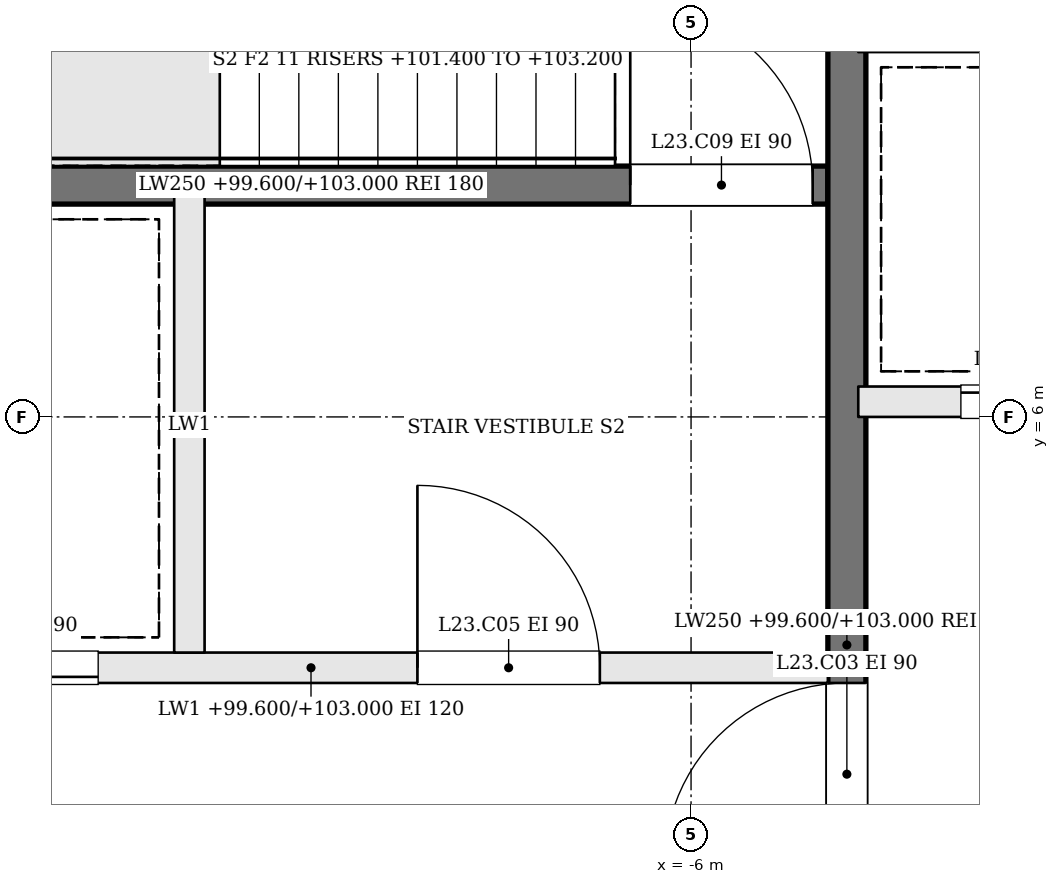
"""IFC4 building model, lengths in metres.
Left out: names, types, materials, properties, quantities, classifications, styles, units other than length and angle.
Written with IfcOpenShell. Run it as: python <this file> out.ifc"""

import sys

from ifc_helpers import new_model, si_unit, direction, frame, frame_2d, origin, place, context, subcontext, project, spatial, rectangle, extrude, element, fill, save


model = new_model("IFC4")
c1 = context("Model", 3, precision=1e-05, world=origin(), true_north=direction((0.0, 1.0)))
c2 = subcontext(c1, "Body", "Model", "MODEL_VIEW")
j1 = project(units=[si_unit("LENGTHUNIT", "METRE"), si_unit("PLANEANGLEUNIT", "RADIAN")], contexts=[c1])
p1 = place(None, origin())
s1 = spatial("IfcSite", under=j1, at=p1, CompositionType="ELEMENT")
p2 = place(p1, origin())
s2 = spatial("IfcBuilding", under=s1, at=p2, CompositionType="ELEMENT")
p3 = place(p2, frame((0.0, 0.0, 99.6)))
s3 = spatial("IfcBuildingStorey", under=s2, at=p3, CompositionType="ELEMENT", Elevation=99.6)
p4 = place(p3, frame((-11.9, 4.35, 0.0), z_axis=(0.0, 0.0, 1.0), x_axis=(1.0, 0.0, 0.0)))
e1 = element("IfcWall", 1, at=p4, inside=s3, PredefinedType="SOLIDWALL", context=c2, shape_type="SweptSolid", body=[
    extrude(rectangle(XDim=6.8, YDim=0.2, at=frame_2d((3.4, 0.0))), origin(), (0.0, 0.0, 1.0), 3.4),
])
p5 = place(p4, frame((4.1, 0.0, 0.0)))
e2 = element("IfcOpeningElement", 2, at=p5, cuts=e1, PredefinedType="OPENING", context=c2, shape_type="SweptSolid", body=[
    extrude(rectangle(XDim=1.2, YDim=2.1, at=frame_2d((0.6, 1.05))), frame((0.0, 0.11, 0.0), z_axis=(0.0, -1.0, 0.0), x_axis=(1.0, 0.0, 0.0)), (0.0, 0.0, 1.0), 0.22),
])
p6 = place(p4, frame((0.8, 0.0, 0.0)))
e3 = element("IfcOpeningElement", 3, at=p6, cuts=e1, PredefinedType="OPENING", context=c2, shape_type="SweptSolid", body=[
    extrude(rectangle(XDim=1.2, YDim=2.1, at=frame_2d((0.6, 1.05))), frame((0.0, 0.11, 0.0), z_axis=(0.0, -1.0, 0.0), x_axis=(1.0, 0.0, 0.0)), (0.0, 0.0, 1.0), 0.22),
])
p7 = place(p3, frame((-11.9, 7.525, 0.0), z_axis=(0.0, 0.0, 1.0), x_axis=(1.0, 0.0, 0.0)))
e4 = element("IfcWall", 4, at=p7, inside=s3, PredefinedType="SOLIDWALL", context=c2, shape_type="SweptSolid", body=[
    extrude(rectangle(XDim=6.8, YDim=0.25, at=frame_2d((3.4, 0.0))), origin(), (0.0, 0.0, 1.0), 3.4),
])
p8 = place(p7, frame((5.5, 0.0, 0.0)))
e5 = element("IfcOpeningElement", 5, at=p8, cuts=e4, PredefinedType="OPENING", context=c2, shape_type="SweptSolid", body=[
    extrude(rectangle(XDim=1.2, YDim=2.1, at=frame_2d((0.6, 1.05))), frame((0.0, 0.135, 0.0), z_axis=(0.0, -1.0, 0.0), x_axis=(1.0, 0.0, 0.0)), (0.0, 0.0, 1.0), 0.27),
])
p9 = place(p3, frame((-9.3, 4.45, 0.0), z_axis=(0.0, 0.0, 1.0), x_axis=(0.0, 1.0, 0.0)))
e6 = element("IfcWall", 6, at=p9, inside=s3, PredefinedType="SOLIDWALL", context=c2, shape_type="SweptSolid", body=[
    extrude(rectangle(XDim=3.0, YDim=0.2, at=frame_2d((1.5, 0.0))), origin(), (0.0, 0.0, 1.0), 3.4),
])
p10 = place(p3, frame((-4.975, -1.9, 0.0), z_axis=(0.0, 0.0, 1.0), x_axis=(0.0, 1.0, 0.0)))
e7 = element("IfcWall", 7, at=p10, inside=s3, PredefinedType="SOLIDWALL", context=c2, shape_type="SweptSolid", body=[
    extrude(rectangle(XDim=12.8, YDim=0.25, at=frame_2d((6.4, 0.0))), origin(), (0.0, 0.0, 1.0), 3.4),
])
p11 = place(p10, frame((4.95, 0.0, 0.0)))
e8 = element("IfcOpeningElement", 8, at=p11, cuts=e7, PredefinedType="OPENING", context=c2, shape_type="SweptSolid", body=[
    extrude(rectangle(XDim=1.2, YDim=2.1, at=frame_2d((0.6, 1.05))), frame((0.0, 0.135, 0.0), z_axis=(0.0, -1.0, 0.0), x_axis=(1.0, 0.0, 0.0)), (0.0, 0.0, 1.0), 0.27),
])
p12 = place(p3, frame((-4.9, 6.1, 0.0), z_axis=(0.0, 0.0, 1.0), x_axis=(1.0, 0.0, 0.0)))
e9 = element("IfcWall", 9, at=p12, inside=s3, PredefinedType="SOLIDWALL", context=c2, shape_type="SweptSolid", body=[
    extrude(rectangle(XDim=9.8, YDim=0.2, at=frame_2d((4.9, 0.0))), origin(), (0.0, 0.0, 1.0), 3.4),
])
p13 = place(p12, frame((0.675, 0.0, 0.0)))
e10 = element("IfcOpeningElement", 10, at=p13, cuts=e9, PredefinedType="OPENING", context=c2, shape_type="SweptSolid", body=[
    extrude(rectangle(XDim=1.1, YDim=2.1, at=frame_2d((0.55, 1.05))), frame((0.0, 0.11, 0.0), z_axis=(0.0, -1.0, 0.0), x_axis=(1.0, 0.0, 0.0)), (0.0, 0.0, 1.0), 0.22),
])
p14 = place(p12, frame((3.125, 0.0, 0.0)))
e11 = element("IfcOpeningElement", 11, at=p14, cuts=e9, PredefinedType="OPENING", context=c2, shape_type="SweptSolid", body=[
    extrude(rectangle(XDim=1.1, YDim=2.1, at=frame_2d((0.55, 1.05))), frame((0.0, 0.11, 0.0), z_axis=(0.0, -1.0, 0.0), x_axis=(1.0, 0.0, 0.0)), (0.0, 0.0, 1.0), 0.22),
])
p15 = place(p12, frame((5.575, 0.0, 0.0)))
e12 = element("IfcOpeningElement", 12, at=p15, cuts=e9, PredefinedType="OPENING", context=c2, shape_type="SweptSolid", body=[
    extrude(rectangle(XDim=1.1, YDim=2.1, at=frame_2d((0.55, 1.05))), frame((0.0, 0.11, 0.0), z_axis=(0.0, -1.0, 0.0), x_axis=(1.0, 0.0, 0.0)), (0.0, 0.0, 1.0), 0.22),
])
p16 = place(p12, frame((8.025, 0.0, 0.0)))
e13 = element("IfcOpeningElement", 13, at=p16, cuts=e9, PredefinedType="OPENING", context=c2, shape_type="SweptSolid", body=[
    extrude(rectangle(XDim=1.1, YDim=2.1, at=frame_2d((0.55, 1.05))), frame((0.0, 0.11, 0.0), z_axis=(0.0, -1.0, 0.0), x_axis=(1.0, 0.0, 0.0)), (0.0, 0.0, 1.0), 0.22),
])
p17 = place(p11, origin())
e14 = element("IfcDoor", 14, at=p17, inside=s3, OperationType="SINGLE_SWING_LEFT", PredefinedType="DOOR", context=c2, shape_type="SweptSolid", body=[
    extrude(rectangle(XDim=1.2, YDim=2.1, at=frame_2d((0.6, 1.05))), frame((0.0, 0.025, 0.0), z_axis=(0.0, -1.0, 0.0), x_axis=(1.0, 0.0, 0.0)), (0.0, 0.0, 1.0), 0.05),
])
fill(e8, e14)
p18 = place(p5, origin())
e15 = element("IfcDoor", 15, at=p18, inside=s3, OperationType="SINGLE_SWING_LEFT", PredefinedType="DOOR", context=c2, shape_type="SweptSolid", body=[
    extrude(rectangle(XDim=1.2, YDim=2.1, at=frame_2d((0.6, 1.05))), frame((0.0, 0.025, 0.0), z_axis=(0.0, -1.0, 0.0), x_axis=(1.0, 0.0, 0.0)), (0.0, 0.0, 1.0), 0.05),
])
fill(e2, e15)
p19 = place(p8, origin())
e16 = element("IfcDoor", 16, at=p19, inside=s3, OperationType="SINGLE_SWING_LEFT", PredefinedType="DOOR", context=c2, shape_type="SweptSolid", body=[
    extrude(rectangle(XDim=1.2, YDim=2.1, at=frame_2d((0.6, 1.05))), frame((0.0, 0.025, 0.0), z_axis=(0.0, -1.0, 0.0), x_axis=(1.0, 0.0, 0.0)), (0.0, 0.0, 1.0), 0.05),
])
fill(e5, e16)
p20 = place(p6, origin())
e17 = element("IfcDoor", 17, at=p20, inside=s3, OperationType="SLIDING_TO_RIGHT", PredefinedType="DOOR", context=c2, shape_type="SweptSolid", body=[
    extrude(rectangle(XDim=1.2, YDim=2.1, at=frame_2d((0.6, 1.05))), frame((0.0, 0.025, 0.0), z_axis=(0.0, -1.0, 0.0), x_axis=(1.0, 0.0, 0.0)), (0.0, 0.0, 1.0), 0.05),
])
fill(e3, e17)
p21 = place(p13, origin())
e18 = element("IfcDoor", 18, at=p21, inside=s3, OperationType="SLIDING_TO_RIGHT", PredefinedType="DOOR", context=c2, shape_type="SweptSolid", body=[
    extrude(rectangle(XDim=1.1, YDim=2.1, at=frame_2d((0.55, 1.05))), frame((0.0, 0.025, 0.0), z_axis=(0.0, -1.0, 0.0), x_axis=(1.0, 0.0, 0.0)), (0.0, 0.0, 1.0), 0.05),
])
fill(e10, e18)
save(model, sys.argv[1])
